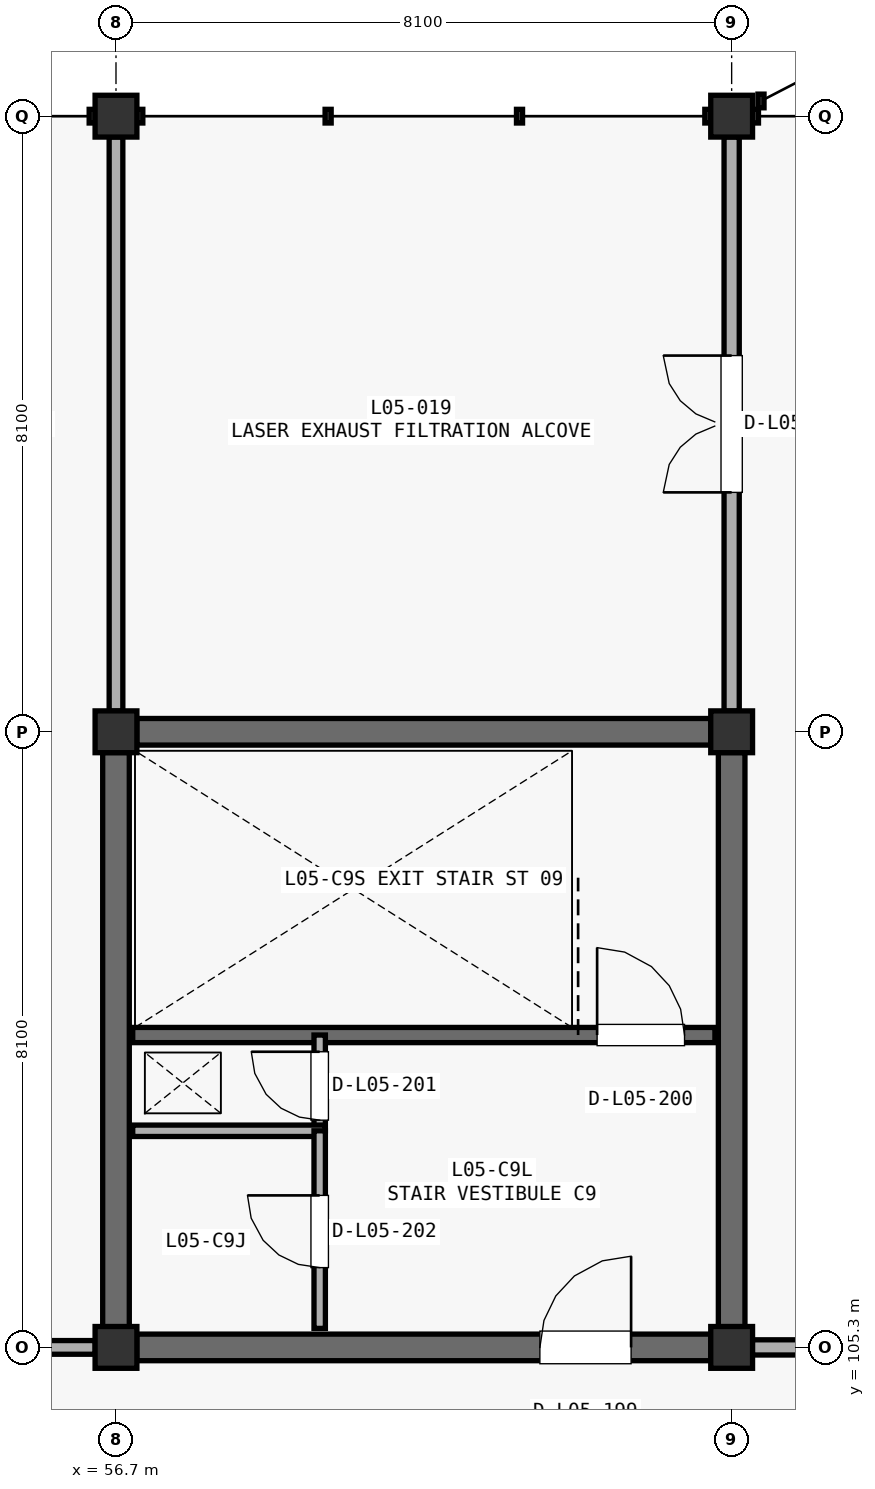
"""IFC4 building model, lengths in metres.
Left out: names, types, materials, properties, quantities, classifications, styles, units other than length and angle.
Written with IfcOpenShell. Run it as: python <this file> out.ifc"""

import sys

from ifc_helpers import new_model, si_unit, direction, frame, frame_2d, origin, origin_2d, place, context, subcontext, project, spatial, rectangle, extrude, element, fill, save


model = new_model("IFC4")
c1 = context("Model", 3, precision=1e-05, world=origin(), true_north=direction((0.0, 1.0)))
c2 = subcontext(c1, "Body", "Model", "MODEL_VIEW")
j1 = project(units=[si_unit("LENGTHUNIT", "METRE"), si_unit("PLANEANGLEUNIT", "RADIAN")], contexts=[c1])
p1 = place(None, origin())
s1 = spatial("IfcSite", under=j1, at=p1, CompositionType="ELEMENT")
p2 = place(p1, origin())
s2 = spatial("IfcBuilding", under=s1, at=p2, CompositionType="ELEMENT")
p3 = place(p2, frame((0.0, 0.0, 22.95)))
s3 = spatial("IfcBuildingStorey", under=s2, at=p3, CompositionType="ELEMENT", Elevation=22.95)
for number, where, z_axis, x_axis in (
    (1, (56.7, 105.3, 0.0), (0.0, 0.0, 1.0), (1.0, 0.0, 0.0)),
    (2, (56.7, 113.4, 0.0), (0.0, 0.0, 1.0), (1.0, 0.0, 0.0)),
    (3, (56.7, 121.5, 0.0), (0.0, 0.0, 1.0), (1.0, 0.0, 0.0)),
    (4, (64.8, 105.3, 0.0), (0.0, 0.0, 1.0), (1.0, 0.0, 0.0)),
    (5, (64.8, 113.4, 0.0), (0.0, 0.0, 1.0), (1.0, 0.0, 0.0)),
    (6, (64.8, 121.5, 0.0), (0.0, 0.0, 1.0), (1.0, 0.0, 0.0)),
):
    element("IfcColumn", number, at=place(p3, frame(where, z_axis=z_axis, x_axis=x_axis)), inside=s3, PredefinedType="COLUMN", context=c2, shape_type="SweptSolid", body=[
        extrude(rectangle(XDim=0.55, YDim=0.55, at=origin_2d()), origin(), (0.0, 0.0, 1.0), 4.42),
    ])
p4 = place(p3, frame((56.973, 113.4, 0.0), z_axis=(0.0, 0.0, 1.0), x_axis=(1.0, 0.0, 0.0)))
e7 = element("IfcWall", 7, at=p4, inside=s3, PredefinedType="SHEAR", context=c2, shape_type="SweptSolid", body=[
    extrude(rectangle(XDim=7.554, YDim=0.35, at=frame_2d((3.777, 0.0))), origin(), (0.0, 0.0, 1.0), 4.162),
])
for number, where, z_axis, x_axis in (
    (8, (56.7, 105.573, 0.0), (0.0, 0.0, 1.0), (0.0, 1.0, 0.0)),
    (9, (64.8, 105.573, 0.0), (0.0, 0.0, 1.0), (0.0, 1.0, 0.0)),
):
    element("IfcWall", number, at=place(p3, frame(where, z_axis=z_axis, x_axis=x_axis)), inside=s3, PredefinedType="SHEAR", context=c2, shape_type="SweptSolid", body=[
        extrude(rectangle(XDim=7.554, YDim=0.35, at=frame_2d((3.777, 0.0))), origin(), (0.0, 0.0, 1.0), 4.162),
    ])
p5 = place(p3, frame((56.973, 105.3, 0.0), z_axis=(0.0, 0.0, 1.0), x_axis=(1.0, 0.0, 0.0)))
e10 = element("IfcWall", 10, at=p5, inside=s3, PredefinedType="SHEAR", context=c2, shape_type="SweptSolid", body=[
    extrude(rectangle(XDim=7.554, YDim=0.35, at=frame_2d((3.777, 0.0))), origin(), (0.0, 0.0, 1.0), 4.162),
])
p6 = place(p5, frame((5.304, 0.0, 0.0)))
e11 = element("IfcOpeningElement", 11, at=p6, cuts=e10, PredefinedType="OPENING", context=c2, shape_type="SweptSolid", body=[
    extrude(rectangle(XDim=1.2, YDim=2.2, at=frame_2d((0.6, 1.1))), frame((0.0, 0.185, 0.0), z_axis=(0.0, -1.0, 0.0), x_axis=(1.0, 0.0, 0.0)), (0.0, 0.0, 1.0), 0.37),
])
p7 = place(p3, frame((56.92, 109.41, 0.0), z_axis=(0.0, 0.0, 1.0), x_axis=(1.0, 0.0, 0.0)))
e12 = element("IfcWall", 12, at=p7, inside=s3, PredefinedType="SHEAR", context=c2, shape_type="SweptSolid", body=[
    extrude(rectangle(XDim=7.66, YDim=0.2, at=frame_2d((3.83, 0.0))), origin(), (0.0, 0.0, 1.0), 4.162),
])
p8 = place(p7, frame((6.11, 0.0, 0.0)))
e13 = element("IfcOpeningElement", 13, at=p8, cuts=e12, PredefinedType="OPENING", context=c2, shape_type="SweptSolid", body=[
    extrude(rectangle(XDim=1.15, YDim=2.2, at=frame_2d((0.575, 1.1))), frame((0.0, 0.11, 0.0), z_axis=(0.0, -1.0, 0.0), x_axis=(1.0, 0.0, 0.0)), (0.0, 0.0, 1.0), 0.22),
])
p9 = place(p3, frame((59.38, 108.15, 0.0), z_axis=(0.0, 0.0, 1.0), x_axis=(0.0, 1.0, 0.0)))
e14 = element("IfcWall", 14, at=p9, inside=s3, PredefinedType="PARTITIONING", context=c2, shape_type="SweptSolid", body=[
    extrude(rectangle(XDim=1.26, YDim=0.15, at=frame_2d((0.63, 0.0))), origin(), (0.0, 0.0, 1.0), 4.162),
])
p10 = place(p9, frame((0.14, 0.0, 0.0)))
e15 = element("IfcOpeningElement", 15, at=p10, cuts=e14, PredefinedType="OPENING", context=c2, shape_type="SweptSolid", body=[
    extrude(rectangle(XDim=0.9, YDim=2.15, at=frame_2d((0.45, 1.075))), frame((0.0, 0.085, 0.0), z_axis=(0.0, -1.0, 0.0), x_axis=(1.0, 0.0, 0.0)), (0.0, 0.0, 1.0), 0.17),
])
p11 = place(p3, frame((56.92, 108.15, 0.0), z_axis=(0.0, 0.0, 1.0), x_axis=(1.0, 0.0, 0.0)))
e16 = element("IfcWall", 16, at=p11, inside=s3, PredefinedType="PARTITIONING", context=c2, shape_type="SweptSolid", body=[
    extrude(rectangle(XDim=2.53, YDim=0.15, at=frame_2d((1.265, 0.0))), origin(), (0.0, 0.0, 1.0), 4.162),
])
p12 = place(p3, frame((59.38, 105.55, 0.0), z_axis=(0.0, 0.0, 1.0), x_axis=(0.0, 1.0, 0.0)))
e17 = element("IfcWall", 17, at=p12, inside=s3, PredefinedType="PARTITIONING", context=c2, shape_type="SweptSolid", body=[
    extrude(rectangle(XDim=2.6, YDim=0.15, at=frame_2d((1.3, 0.0))), origin(), (0.0, 0.0, 1.0), 4.162),
])
p13 = place(p12, frame((0.8, 0.0, 0.0)))
e18 = element("IfcOpeningElement", 18, at=p13, cuts=e17, PredefinedType="OPENING", context=c2, shape_type="SweptSolid", body=[
    extrude(rectangle(XDim=0.95, YDim=2.15, at=frame_2d((0.475, 1.075))), frame((0.0, 0.085, 0.0), z_axis=(0.0, -1.0, 0.0), x_axis=(1.0, 0.0, 0.0)), (0.0, 0.0, 1.0), 0.17),
])
p14 = place(p3, frame((48.873, 105.3, 0.0), z_axis=(0.0, 0.0, 1.0), x_axis=(1.0, 0.0, 0.0)))
e19 = element("IfcWall", 19, at=p14, inside=s3, PredefinedType="PARTITIONING", context=c2, shape_type="SweptSolid", body=[
    extrude(rectangle(XDim=7.554, YDim=0.18, at=frame_2d((3.777, 0.0))), origin(), (0.0, 0.0, 1.0), 3.412),
])
p15 = place(p14, frame((3.237, 0.0, 0.0)))
e20 = element("IfcOpeningElement", 20, at=p15, cuts=e19, PredefinedType="OPENING", context=c2, shape_type="SweptSolid", body=[
    extrude(rectangle(XDim=1.08, YDim=2.15, at=frame_2d((0.54, 1.075))), frame((0.0, 0.1, 0.0), z_axis=(0.0, -1.0, 0.0), x_axis=(1.0, 0.0, 0.0)), (0.0, 0.0, 1.0), 0.2),
])
p16 = place(p3, frame((56.7, 113.673, 0.0), z_axis=(0.0, 0.0, 1.0), x_axis=(0.0, 1.0, 0.0)))
e21 = element("IfcWall", 21, at=p16, inside=s3, PredefinedType="PARTITIONING", context=c2, shape_type="SweptSolid", body=[
    extrude(rectangle(XDim=7.554, YDim=0.18, at=frame_2d((3.777, 0.0))), origin(), (0.0, 0.0, 1.0), 3.212),
])
p17 = place(p3, frame((65.073, 105.3, 0.0), z_axis=(0.0, 0.0, 1.0), x_axis=(1.0, 0.0, 0.0)))
e22 = element("IfcWall", 22, at=p17, inside=s3, PredefinedType="PARTITIONING", context=c2, shape_type="SweptSolid", body=[
    extrude(rectangle(XDim=7.554, YDim=0.2, at=frame_2d((3.777, 0.0))), origin(), (0.0, 0.0, 1.0), 3.562),
])
p18 = place(p17, frame((2.877, 0.0, 0.0)))
e23 = element("IfcOpeningElement", 23, at=p18, cuts=e22, PredefinedType="OPENING", context=c2, shape_type="SweptSolid", body=[
    extrude(rectangle(XDim=1.8, YDim=2.4, at=frame_2d((0.9, 1.2))), frame((0.0, 0.11, 0.0), z_axis=(0.0, -1.0, 0.0), x_axis=(1.0, 0.0, 0.0)), (0.0, 0.0, 1.0), 0.22),
])
p19 = place(p3, frame((64.8, 113.673, 0.0), z_axis=(0.0, 0.0, 1.0), x_axis=(0.0, 1.0, 0.0)))
e24 = element("IfcWall", 24, at=p19, inside=s3, PredefinedType="PARTITIONING", context=c2, shape_type="SweptSolid", body=[
    extrude(rectangle(XDim=7.554, YDim=0.2, at=frame_2d((3.777, 0.0))), origin(), (0.0, 0.0, 1.0), 3.512),
])
p20 = place(p19, frame((2.877, 0.0, 0.0)))
e25 = element("IfcOpeningElement", 25, at=p20, cuts=e24, PredefinedType="OPENING", context=c2, shape_type="SweptSolid", body=[
    extrude(rectangle(XDim=1.8, YDim=2.4, at=frame_2d((0.9, 1.2))), frame((0.0, 0.11, 0.0), z_axis=(0.0, -1.0, 0.0), x_axis=(1.0, 0.0, 0.0)), (0.0, 0.0, 1.0), 0.22),
])
p21 = place(p6, origin())
e26 = element("IfcDoor", 26, at=p21, inside=s3, OperationType="SINGLE_SWING_RIGHT", PredefinedType="DOOR", context=c2, shape_type="SweptSolid", body=[
    extrude(rectangle(XDim=1.2, YDim=2.2, at=frame_2d((0.6, 1.1))), frame((0.0, 0.025, 0.0), z_axis=(0.0, -1.0, 0.0), x_axis=(1.0, 0.0, 0.0)), (0.0, 0.0, 1.0), 0.05),
])
fill(e11, e26)
p22 = place(p8, origin())
e27 = element("IfcDoor", 27, at=p22, inside=s3, OperationType="SINGLE_SWING_LEFT", PredefinedType="DOOR", context=c2, shape_type="SweptSolid", body=[
    extrude(rectangle(XDim=1.15, YDim=2.2, at=frame_2d((0.575, 1.1))), frame((0.0, 0.025, 0.0), z_axis=(0.0, -1.0, 0.0), x_axis=(1.0, 0.0, 0.0)), (0.0, 0.0, 1.0), 0.05),
])
fill(e13, e27)
p23 = place(p10, origin())
e28 = element("IfcDoor", 28, at=p23, inside=s3, OperationType="SINGLE_SWING_RIGHT", PredefinedType="DOOR", context=c2, shape_type="SweptSolid", body=[
    extrude(rectangle(XDim=0.9, YDim=2.15, at=frame_2d((0.45, 1.075))), frame((0.0, 0.025, 0.0), z_axis=(0.0, -1.0, 0.0), x_axis=(1.0, 0.0, 0.0)), (0.0, 0.0, 1.0), 0.05),
])
fill(e15, e28)
p24 = place(p13, origin())
e29 = element("IfcDoor", 29, at=p24, inside=s3, OperationType="SINGLE_SWING_RIGHT", PredefinedType="DOOR", context=c2, shape_type="SweptSolid", body=[
    extrude(rectangle(XDim=0.95, YDim=2.15, at=frame_2d((0.475, 1.075))), frame((0.0, 0.025, 0.0), z_axis=(0.0, -1.0, 0.0), x_axis=(1.0, 0.0, 0.0)), (0.0, 0.0, 1.0), 0.05),
])
fill(e18, e29)
p25 = place(p20, origin())
e30 = element("IfcDoor", 30, at=p25, inside=s3, OperationType="DOUBLE_SWING_LEFT", PredefinedType="DOOR", context=c2, shape_type="SweptSolid", body=[
    extrude(rectangle(XDim=1.8, YDim=2.4, at=frame_2d((0.9, 1.2))), frame((0.0, 0.025, 0.0), z_axis=(0.0, -1.0, 0.0), x_axis=(1.0, 0.0, 0.0)), (0.0, 0.0, 1.0), 0.05),
])
fill(e25, e30)
save(model, sys.argv[1])
